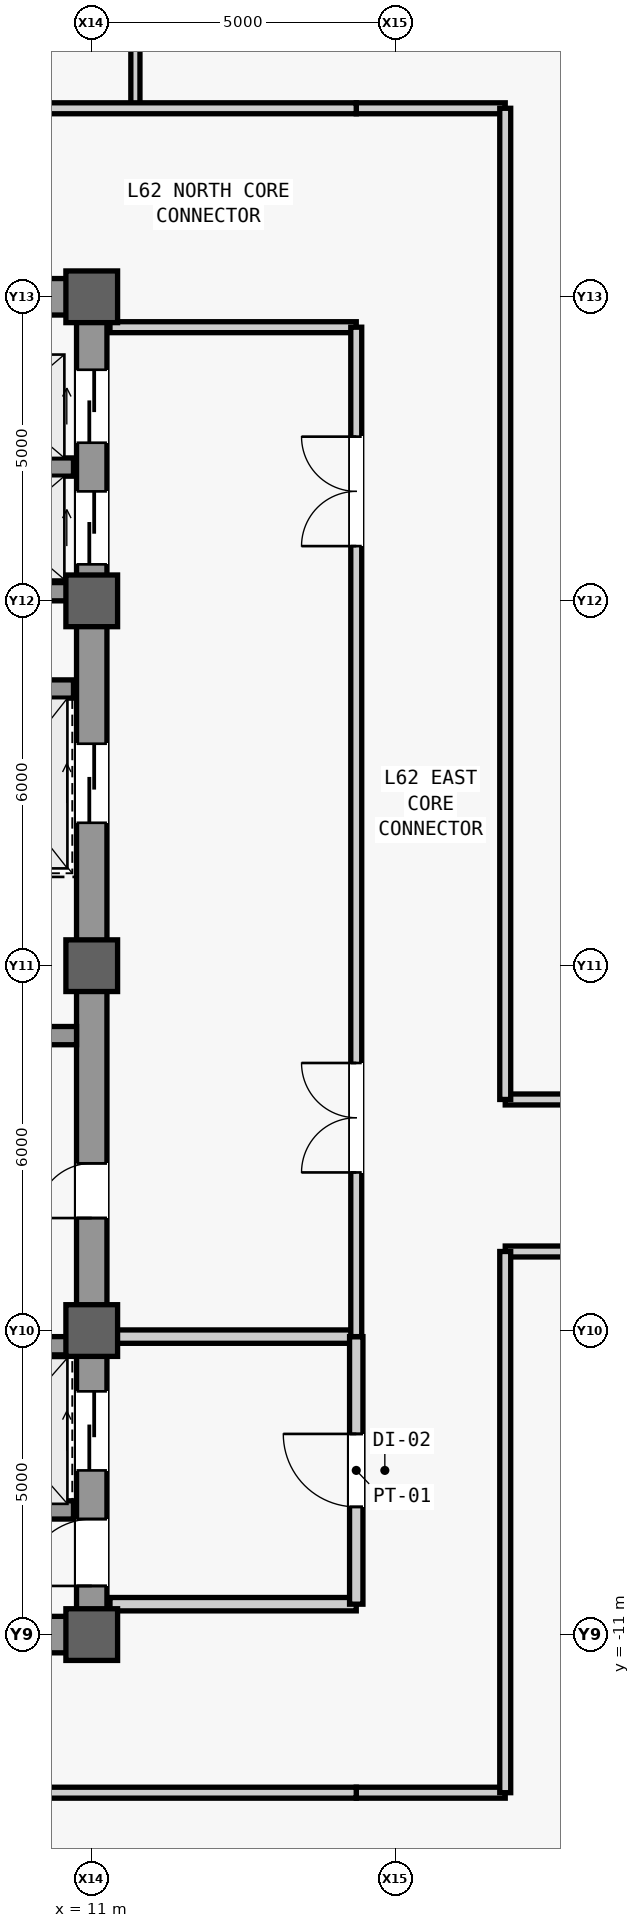
"""IFC4 building model, lengths in metres.
Left out: names, types, materials, properties, quantities, classifications, styles, units other than length and angle.
Written with IfcOpenShell. Run it as: python <this file> out.ifc"""

import sys

from ifc_helpers import new_model, si_unit, direction, frame, frame_2d, origin, origin_2d, place, context, subcontext, project, spatial, rectangle, extrude, source, transform, mapped, element, fill, save


model = new_model("IFC4")
c1 = context("Model", 3, precision=1e-05, world=origin(), true_north=direction((0.0, 1.0)))
c2 = subcontext(c1, "Body", "Model", "MODEL_VIEW")
j1 = project(units=[si_unit("LENGTHUNIT", "METRE"), si_unit("PLANEANGLEUNIT", "RADIAN")], contexts=[c1])
p1 = place(None, origin())
s1 = spatial("IfcSite", under=j1, at=p1, CompositionType="ELEMENT")
p2 = place(p1, origin())
s2 = spatial("IfcBuilding", under=s1, at=p2, CompositionType="ELEMENT")
p3 = place(p2, frame((0.0, 0.0, 263.1)))
s3 = spatial("IfcBuildingStorey", under=s2, at=p3, CompositionType="ELEMENT", Elevation=263.1)
m1 = source(origin(), c2, "Body", "SweptSolid", [
    extrude(rectangle(XDim=22.0, YDim=0.5, at=frame_2d((11.0, 0.0))), origin(), (0.0, 0.0, 1.0), 4.6),
])
p4 = place(p3, frame((11.0, -11.0, 0.0), z_axis=(0.0, 0.0, 1.0), x_axis=(0.0, 1.0, 0.0)))
e1 = element("IfcWall", 1, at=p4, inside=s3, PredefinedType="SHEAR", context=c2, shape_type="MappedRepresentation", body=[
    mapped(m1, transform((0.0, 0.0, 0.0), scale=1.0)),
])
m2 = source(origin(), c2, "Body", "SweptSolid", [
    extrude(rectangle(XDim=1.1, YDim=2.2, at=frame_2d((0.55, 1.1))), frame((0.0, 0.26, 0.0), z_axis=(0.0, -1.0, 0.0), x_axis=(1.0, 0.0, 0.0)), (0.0, 0.0, 1.0), 0.52),
])
p5 = place(p4, frame((0.8, 0.0, 0.0)))
e2 = element("IfcOpeningElement", 2, at=p5, cuts=e1, PredefinedType="OPENING", context=c2, shape_type="MappedRepresentation", body=[
    mapped(m2, transform((0.0, 0.0, 0.0), scale=1.0)),
])
m3 = source(origin(), c2, "Body", "SweptSolid", [
    extrude(rectangle(XDim=0.9, YDim=2.15, at=frame_2d((0.45, 1.075))), frame((0.0, 0.26, 0.0), z_axis=(0.0, -1.0, 0.0), x_axis=(1.0, 0.0, 0.0)), (0.0, 0.0, 1.0), 0.52),
])
p6 = place(p4, frame((6.85, 0.0, 0.0)))
e3 = element("IfcOpeningElement", 3, at=p6, cuts=e1, PredefinedType="OPENING", context=c2, shape_type="MappedRepresentation", body=[
    mapped(m3, transform((0.0, 0.0, 0.0), scale=1.0)),
])
m4 = source(origin(), c2, "Body", "SweptSolid", [
    extrude(rectangle(XDim=1.2, YDim=2.3, at=frame_2d((0.6, 1.15))), frame((0.0, 0.26, 0.0), z_axis=(0.0, -1.0, 0.0), x_axis=(1.0, 0.0, 0.0)), (0.0, 0.0, 1.0), 0.52),
])
p7 = place(p4, frame((17.6, 0.0, 0.0)))
e4 = element("IfcOpeningElement", 4, at=p7, cuts=e1, PredefinedType="OPENING", context=c2, shape_type="MappedRepresentation", body=[
    mapped(m4, transform((0.0, 0.0, 0.0), scale=1.0)),
])
p8 = place(p4, frame((19.6, 0.0, 0.0)))
e5 = element("IfcOpeningElement", 5, at=p8, cuts=e1, PredefinedType="OPENING", context=c2, shape_type="MappedRepresentation", body=[
    mapped(m4, transform((0.0, 0.0, 0.0), scale=1.0)),
])
m5 = source(origin(), c2, "Body", "SweptSolid", [
    extrude(rectangle(XDim=1.3, YDim=2.3, at=frame_2d((0.65, 1.15))), frame((0.0, 0.26, 0.0), z_axis=(0.0, -1.0, 0.0), x_axis=(1.0, 0.0, 0.0)), (0.0, 0.0, 1.0), 0.52),
])
p9 = place(p4, frame((2.7, 0.0, 0.0)))
e6 = element("IfcOpeningElement", 6, at=p9, cuts=e1, PredefinedType="OPENING", context=c2, shape_type="MappedRepresentation", body=[
    mapped(m5, transform((0.0, 0.0, 0.0), scale=1.0)),
])
p10 = place(p4, frame((13.35, 0.0, 0.0)))
e7 = element("IfcOpeningElement", 7, at=p10, cuts=e1, PredefinedType="OPENING", context=c2, shape_type="MappedRepresentation", body=[
    mapped(m5, transform((0.0, 0.0, 0.0), scale=1.0)),
])
m6 = source(origin(), c2, "Body", "SweptSolid", [
    extrude(rectangle(XDim=5.9, YDim=0.6, at=frame_2d((2.95, 0.0))), origin(), (0.0, 0.0, 1.0), 4.6),
])
p11 = place(p3, frame((4.85, -11.0, 0.0), z_axis=(0.0, 0.0, 1.0), x_axis=(1.0, 0.0, 0.0)))
e8 = element("IfcWall", 8, at=p11, inside=s3, PredefinedType="SHEAR", context=c2, shape_type="MappedRepresentation", body=[
    mapped(m6, transform((0.0, 0.0, 0.0), scale=1.0)),
])
p12 = place(p3, frame((4.85, 11.0, 0.0), z_axis=(0.0, 0.0, 1.0), x_axis=(1.0, 0.0, 0.0)))
e9 = element("IfcWall", 9, at=p12, inside=s3, PredefinedType="SHEAR", context=c2, shape_type="MappedRepresentation", body=[
    mapped(m6, transform((0.0, 0.0, 0.0), scale=1.0)),
])
m7 = source(origin(), c2, "Body", "SweptSolid", [
    extrude(rectangle(XDim=1.05, YDim=2.2, at=frame_2d((0.525, 1.1))), frame((0.0, 0.31, 0.0), z_axis=(0.0, -1.0, 0.0), x_axis=(1.0, 0.0, 0.0)), (0.0, 0.0, 1.0), 0.62),
])
p13 = place(p12, frame((1.375, 0.0, 0.0)))
e10 = element("IfcOpeningElement", 10, at=p13, cuts=e9, PredefinedType="OPENING", context=c2, shape_type="MappedRepresentation", body=[
    mapped(m7, transform((0.0, 0.0, 0.0), scale=1.0)),
])
m8 = source(origin(), c2, "Body", "SweptSolid", [
    extrude(rectangle(XDim=5.65, YDim=0.3, at=frame_2d((2.825, 0.0))), origin(), (0.0, 0.0, 1.0), 4.6),
])
p14 = place(p3, frame((5.1, -1.15, 0.0), z_axis=(0.0, 0.0, 1.0), x_axis=(1.0, 0.0, 0.0)))
e11 = element("IfcWall", 11, at=p14, inside=s3, PredefinedType="SHEAR", context=c2, shape_type="MappedRepresentation", body=[
    mapped(m8, transform((0.0, 0.0, 0.0), scale=1.0)),
])
m9 = source(origin(), c2, "Body", "SweptSolid", [
    extrude(rectangle(XDim=0.85, YDim=0.85, at=origin_2d()), origin(), (0.0, 0.0, 1.0), 5.2),
])
for number, where, z_axis, x_axis in (
    (12, (11.0, -11.0, 0.0), (0.0, 0.0, 1.0), (1.0, 0.0, 0.0)),
    (13, (11.0, -6.0, 0.0), (0.0, 0.0, 1.0), (1.0, 0.0, 0.0)),
    (14, (11.0, 0.0, 0.0), (0.0, 0.0, 1.0), (1.0, 0.0, 0.0)),
    (15, (11.0, 6.0, 0.0), (0.0, 0.0, 1.0), (1.0, 0.0, 0.0)),
    (16, (11.0, 11.0, 0.0), (0.0, 0.0, 1.0), (1.0, 0.0, 0.0)),
):
    element("IfcColumn", number, at=place(p3, frame(where, z_axis=z_axis, x_axis=x_axis)), inside=s3, PredefinedType="COLUMN", context=c2, shape_type="MappedRepresentation", body=[
        mapped(m9, transform((0.0, 0.0, 0.0), scale=1.0)),
    ])
m10 = source(origin(), c2, "Body", "SweptSolid", [
    extrude(rectangle(XDim=2.2, YDim=0.3, at=frame_2d((1.1, 0.0))), origin(), (0.0, 0.0, 1.0), 4.6),
])
for number, where, z_axis, x_axis in (
    (17, (8.5, -8.95, 0.0), (0.0, 0.0, 1.0), (1.0, 0.0, 0.0)),
    (18, (8.5, -6.25, 0.0), (0.0, 0.0, 1.0), (1.0, 0.0, 0.0)),
):
    element("IfcWall", number, at=place(p3, frame(where, z_axis=z_axis, x_axis=x_axis)), inside=s3, PredefinedType="SHEAR", context=c2, shape_type="MappedRepresentation", body=[
        mapped(m10, transform((0.0, 0.0, 0.0), scale=1.0)),
    ])
m11 = source(origin(), c2, "Body", "SweptSolid", [
    extrude(rectangle(XDim=2.3, YDim=0.3, at=frame_2d((1.15, 0.0))), origin(), (0.0, 0.0, 1.0), 4.6),
])
for number, where, z_axis, x_axis in (
    (19, (8.4, 4.55, 0.0), (0.0, 0.0, 1.0), (1.0, 0.0, 0.0)),
    (20, (8.4, 6.15, 0.0), (0.0, 0.0, 1.0), (1.0, 0.0, 0.0)),
    (21, (8.4, 8.2, 0.0), (0.0, 0.0, 1.0), (1.0, 0.0, 0.0)),
):
    element("IfcWall", number, at=place(p3, frame(where, z_axis=z_axis, x_axis=x_axis)), inside=s3, PredefinedType="SHEAR", context=c2, shape_type="MappedRepresentation", body=[
        mapped(m11, transform((0.0, 0.0, 0.0), scale=1.0)),
    ])
m12 = source(origin(), c2, "Body", "SweptSolid", [
    extrude(rectangle(XDim=4.05, YDim=0.22, at=frame_2d((2.025, 0.0))), origin(), (0.0, 0.0, 1.0), 4.6),
])
p15 = place(p3, frame((11.3, -10.5, 0.0), z_axis=(0.0, 0.0, 1.0), x_axis=(1.0, 0.0, 0.0)))
e22 = element("IfcWall", 22, at=p15, inside=s3, PredefinedType="PARTITIONING", context=c2, shape_type="MappedRepresentation", body=[
    mapped(m12, transform((0.0, 0.0, 0.0), scale=1.0)),
])
m13 = source(origin(), c2, "Body", "SweptSolid", [
    extrude(rectangle(XDim=4.05, YDim=0.22, at=frame_2d((2.025, 0.0))), origin(), (0.0, 0.0, 1.0), 2.8),
])
p16 = place(p3, frame((11.3, -6.1, 0.0), z_axis=(0.0, 0.0, 1.0), x_axis=(1.0, 0.0, 0.0)))
e23 = element("IfcWall", 23, at=p16, inside=s3, PredefinedType="PARTITIONING", context=c2, shape_type="MappedRepresentation", body=[
    mapped(m13, transform((0.0, 0.0, 0.0), scale=1.0)),
])
m14 = source(origin(), c2, "Body", "SweptSolid", [
    extrude(rectangle(XDim=4.4, YDim=0.22, at=frame_2d((2.2, 0.0))), origin(), (0.0, 0.0, 1.0), 4.6),
])
p17 = place(p3, frame((15.35, -10.5, 0.0), z_axis=(0.0, 0.0, 1.0), x_axis=(0.0, 1.0, 0.0)))
e24 = element("IfcWall", 24, at=p17, inside=s3, PredefinedType="PARTITIONING", context=c2, shape_type="MappedRepresentation", body=[
    mapped(m14, transform((0.0, 0.0, 0.0), scale=1.0)),
])
m15 = source(origin(), c2, "Body", "SweptSolid", [
    extrude(rectangle(XDim=1.2, YDim=2.2, at=frame_2d((0.6, 1.1))), frame((0.0, 0.12, 0.0), z_axis=(0.0, -1.0, 0.0), x_axis=(1.0, 0.0, 0.0)), (0.0, 0.0, 1.0), 0.24),
])
p18 = place(p17, frame((1.6, 0.0, 0.0)))
e25 = element("IfcOpeningElement", 25, at=p18, cuts=e24, PredefinedType="OPENING", context=c2, shape_type="MappedRepresentation", body=[
    mapped(m15, transform((0.0, 0.0, 0.0), scale=1.0)),
])
m16 = source(origin(), c2, "Body", "SweptSolid", [
    extrude(rectangle(XDim=4.05, YDim=0.18, at=frame_2d((2.025, 0.0))), origin(), (0.0, 0.0, 1.0), 4.6),
])
p19 = place(p3, frame((11.3, 10.5, 0.0), z_axis=(0.0, 0.0, 1.0), x_axis=(1.0, 0.0, 0.0)))
e26 = element("IfcWall", 26, at=p19, inside=s3, PredefinedType="PARTITIONING", context=c2, shape_type="MappedRepresentation", body=[
    mapped(m16, transform((0.0, 0.0, 0.0), scale=1.0)),
])
m17 = source(origin(), c2, "Body", "SweptSolid", [
    extrude(rectangle(XDim=16.6, YDim=0.18, at=frame_2d((8.3, 0.0))), origin(), (0.0, 0.0, 1.0), 4.6),
])
p20 = place(p3, frame((15.35, -6.1, 0.0), z_axis=(0.0, 0.0, 1.0), x_axis=(0.0, 1.0, 0.0)))
e27 = element("IfcWall", 27, at=p20, inside=s3, PredefinedType="PARTITIONING", context=c2, shape_type="MappedRepresentation", body=[
    mapped(m17, transform((0.0, 0.0, 0.0), scale=1.0)),
])
m18 = source(origin(), c2, "Body", "SweptSolid", [
    extrude(rectangle(XDim=1.8, YDim=2.25, at=frame_2d((0.9, 1.125))), frame((0.0, 0.1, 0.0), z_axis=(0.0, -1.0, 0.0), x_axis=(1.0, 0.0, 0.0)), (0.0, 0.0, 1.0), 0.2),
])
p21 = place(p20, frame((2.7, 0.0, 0.0)))
e28 = element("IfcOpeningElement", 28, at=p21, cuts=e27, PredefinedType="OPENING", context=c2, shape_type="MappedRepresentation", body=[
    mapped(m18, transform((0.0, 0.0, 0.0), scale=1.0)),
])
p22 = place(p20, frame((13.0, 0.0, 0.0)))
e29 = element("IfcOpeningElement", 29, at=p22, cuts=e27, PredefinedType="OPENING", context=c2, shape_type="MappedRepresentation", body=[
    mapped(m18, transform((0.0, 0.0, 0.0), scale=1.0)),
])
m19 = source(origin(), c2, "Body", "SweptSolid", [
    extrude(rectangle(XDim=2.45, YDim=0.18, at=frame_2d((1.225, 0.0))), origin(), (0.0, 0.0, 1.0), 4.6),
])
for number, where, z_axis, x_axis in (
    (30, (15.35, -13.6, 0.0), (0.0, 0.0, 1.0), (1.0, 0.0, 0.0)),
    (31, (15.35, 14.1, 0.0), (0.0, 0.0, 1.0), (1.0, 0.0, 0.0)),
):
    element("IfcWall", number, at=place(p3, frame(where, z_axis=z_axis, x_axis=x_axis)), inside=s3, PredefinedType="PARTITIONING", context=c2, shape_type="MappedRepresentation", body=[
        mapped(m19, transform((0.0, 0.0, 0.0), scale=1.0)),
    ])
m20 = source(origin(), c2, "Body", "SweptSolid", [
    extrude(rectangle(XDim=25.45, YDim=0.18, at=frame_2d((12.725, 0.0))), origin(), (0.0, 0.0, 1.0), 4.6),
])
p23 = place(p3, frame((-10.1, -13.6, 0.0), z_axis=(0.0, 0.0, 1.0), x_axis=(1.0, 0.0, 0.0)))
e32 = element("IfcWall", 32, at=p23, inside=s3, PredefinedType="PARTITIONING", context=c2, shape_type="MappedRepresentation", body=[
    mapped(m20, transform((0.0, 0.0, 0.0), scale=1.0)),
])
m21 = source(origin(), c2, "Body", "SweptSolid", [
    extrude(rectangle(XDim=15.9, YDim=0.15, at=frame_2d((7.95, 0.0))), origin(), (0.0, 0.0, 1.0), 4.6),
])
p24 = place(p3, frame((11.718, 14.1, 0.0), z_axis=(0.0, 0.0, 1.0), x_axis=(0.0, 1.0, 0.0)))
e33 = element("IfcWall", 33, at=p24, inside=s3, PredefinedType="PARTITIONING", context=c2, shape_type="MappedRepresentation", body=[
    mapped(m21, transform((0.0, 0.0, 0.0), scale=1.0)),
])
m22 = source(origin(), c2, "Body", "SweptSolid", [
    extrude(rectangle(XDim=0.95, YDim=2.15, at=frame_2d((0.475, 1.075))), frame((0.0, 0.085, 0.0), z_axis=(0.0, -1.0, 0.0), x_axis=(1.0, 0.0, 0.0)), (0.0, 0.0, 1.0), 0.17),
])
p25 = place(p24, frame((11.45, 0.0, 0.0)))
e34 = element("IfcOpeningElement", 34, at=p25, cuts=e33, PredefinedType="OPENING", context=c2, shape_type="MappedRepresentation", body=[
    mapped(m22, transform((0.0, 0.0, 0.0), scale=1.0)),
])
m23 = source(origin(), c2, "Body", "SweptSolid", [
    extrude(rectangle(XDim=13.25, YDim=0.18, at=frame_2d((6.625, 0.0))), origin(), (0.0, 0.0, 1.0), 4.6),
])
p26 = place(p3, frame((2.1, 14.1, 0.0), z_axis=(0.0, 0.0, 1.0), x_axis=(1.0, 0.0, 0.0)))
e35 = element("IfcWall", 35, at=p26, inside=s3, PredefinedType="PARTITIONING", context=c2, shape_type="MappedRepresentation", body=[
    mapped(m23, transform((0.0, 0.0, 0.0), scale=1.0)),
])
m24 = source(origin(), c2, "Body", "SweptSolid", [
    extrude(rectangle(XDim=12.2, YDim=0.18, at=frame_2d((6.1, 0.0))), origin(), (0.0, 0.0, 1.0), 4.6),
])
p27 = place(p3, frame((17.8, -4.7, 0.0), z_axis=(0.0, 0.0, 1.0), x_axis=(1.0, 0.0, 0.0)))
e36 = element("IfcWall", 36, at=p27, inside=s3, PredefinedType="PARTITIONING", context=c2, shape_type="MappedRepresentation", body=[
    mapped(m24, transform((0.0, 0.0, 0.0), scale=1.0)),
])
m25 = source(origin(), c2, "Body", "SweptSolid", [
    extrude(rectangle(XDim=0.95, YDim=2.15, at=frame_2d((0.475, 1.075))), frame((0.0, 0.1, 0.0), z_axis=(0.0, -1.0, 0.0), x_axis=(1.0, 0.0, 0.0)), (0.0, 0.0, 1.0), 0.2),
])
p28 = place(p27, frame((2.758, 0.0, 0.0)))
e37 = element("IfcOpeningElement", 37, at=p28, cuts=e36, PredefinedType="OPENING", context=c2, shape_type="MappedRepresentation", body=[
    mapped(m25, transform((0.0, 0.0, 0.0), scale=1.0)),
])
p29 = place(p27, frame((8.858, 0.0, 0.0)))
e38 = element("IfcOpeningElement", 38, at=p29, cuts=e36, PredefinedType="OPENING", context=c2, shape_type="MappedRepresentation", body=[
    mapped(m25, transform((0.0, 0.0, 0.0), scale=1.0)),
])
m26 = source(origin(), c2, "Body", "SweptSolid", [
    extrude(rectangle(XDim=8.9, YDim=0.18, at=frame_2d((4.45, 0.0))), origin(), (0.0, 0.0, 1.0), 4.6),
])
p30 = place(p3, frame((17.8, -13.6, 0.0), z_axis=(0.0, 0.0, 1.0), x_axis=(0.0, 1.0, 0.0)))
e39 = element("IfcWall", 39, at=p30, inside=s3, PredefinedType="PARTITIONING", context=c2, shape_type="MappedRepresentation", body=[
    mapped(m26, transform((0.0, 0.0, 0.0), scale=1.0)),
])
p31 = place(p3, frame((17.8, -2.2, 0.0), z_axis=(0.0, 0.0, 1.0), x_axis=(1.0, 0.0, 0.0)))
e40 = element("IfcWall", 40, at=p31, inside=s3, PredefinedType="PARTITIONING", context=c2, shape_type="MappedRepresentation", body=[
    mapped(m24, transform((0.0, 0.0, 0.0), scale=1.0)),
])
p32 = place(p31, frame((5.625, 0.0, 0.0)))
e41 = element("IfcOpeningElement", 41, at=p32, cuts=e40, PredefinedType="OPENING", context=c2, shape_type="MappedRepresentation", body=[
    mapped(m25, transform((0.0, 0.0, 0.0), scale=1.0)),
])
m27 = source(origin(), c2, "Body", "SweptSolid", [
    extrude(rectangle(XDim=16.3, YDim=0.18, at=frame_2d((8.15, 0.0))), origin(), (0.0, 0.0, 1.0), 4.6),
])
p33 = place(p3, frame((17.8, -2.2, 0.0), z_axis=(0.0, 0.0, 1.0), x_axis=(0.0, 1.0, 0.0)))
e42 = element("IfcWall", 42, at=p33, inside=s3, PredefinedType="PARTITIONING", context=c2, shape_type="MappedRepresentation", body=[
    mapped(m27, transform((0.0, 0.0, 0.0), scale=1.0)),
])
m28 = source(origin(), c2, "Body", "SweptSolid", [
    extrude(rectangle(XDim=1.1, YDim=2.2, at=frame_2d((0.55, 1.1))), frame((0.0, 0.025, 0.0), z_axis=(0.0, -1.0, 0.0), x_axis=(1.0, 0.0, 0.0)), (0.0, 0.0, 1.0), 0.05),
])
p34 = place(p5, origin())
e43 = element("IfcDoor", 43, at=p34, inside=s3, OperationType="SINGLE_SWING_LEFT", PredefinedType="DOOR", context=c2, shape_type="MappedRepresentation", body=[
    mapped(m28, transform((0.0, 0.0, 0.0), scale=1.0)),
])
fill(e2, e43)
m29 = source(origin(), c2, "Body", "SweptSolid", [
    extrude(rectangle(XDim=0.9, YDim=2.15, at=frame_2d((0.45, 1.075))), frame((0.0, 0.025, 0.0), z_axis=(0.0, -1.0, 0.0), x_axis=(1.0, 0.0, 0.0)), (0.0, 0.0, 1.0), 0.05),
])
p35 = place(p6, origin())
e44 = element("IfcDoor", 44, at=p35, inside=s3, OperationType="SINGLE_SWING_LEFT", PredefinedType="DOOR", context=c2, shape_type="MappedRepresentation", body=[
    mapped(m29, transform((0.0, 0.0, 0.0), scale=1.0)),
])
fill(e3, e44)
m30 = source(origin(), c2, "Body", "SweptSolid", [
    extrude(rectangle(XDim=1.2, YDim=2.2, at=frame_2d((0.6, 1.1))), frame((0.0, 0.025, 0.0), z_axis=(0.0, -1.0, 0.0), x_axis=(1.0, 0.0, 0.0)), (0.0, 0.0, 1.0), 0.05),
])
p36 = place(p18, origin())
e45 = element("IfcDoor", 45, at=p36, inside=s3, OperationType="SINGLE_SWING_RIGHT", PredefinedType="DOOR", context=c2, shape_type="MappedRepresentation", body=[
    mapped(m30, transform((0.0, 0.0, 0.0), scale=1.0)),
])
fill(e25, e45)
m31 = source(origin(), c2, "Body", "SweptSolid", [
    extrude(rectangle(XDim=1.8, YDim=2.25, at=frame_2d((0.9, 1.125))), frame((0.0, 0.025, 0.0), z_axis=(0.0, -1.0, 0.0), x_axis=(1.0, 0.0, 0.0)), (0.0, 0.0, 1.0), 0.05),
])
p37 = place(p21, origin())
e46 = element("IfcDoor", 46, at=p37, inside=s3, OperationType="SINGLE_SWING_RIGHT", PredefinedType="DOOR", context=c2, shape_type="MappedRepresentation", body=[
    mapped(m31, transform((0.0, 0.0, 0.0), scale=1.0)),
])
fill(e28, e46)
p38 = place(p22, origin())
e47 = element("IfcDoor", 47, at=p38, inside=s3, OperationType="SINGLE_SWING_LEFT", PredefinedType="DOOR", context=c2, shape_type="MappedRepresentation", body=[
    mapped(m31, transform((0.0, 0.0, 0.0), scale=1.0)),
])
fill(e29, e47)
m32 = source(origin(), c2, "Body", "SweptSolid", [
    extrude(rectangle(XDim=1.2, YDim=2.3, at=frame_2d((0.6, 1.15))), frame((0.0, 0.025, 0.0), z_axis=(0.0, -1.0, 0.0), x_axis=(1.0, 0.0, 0.0)), (0.0, 0.0, 1.0), 0.05),
])
p39 = place(p7, origin())
e48 = element("IfcDoor", 48, at=p39, inside=s3, OperationType="SLIDING_TO_LEFT", PredefinedType="DOOR", context=c2, shape_type="MappedRepresentation", body=[
    mapped(m32, transform((0.0, 0.0, 0.0), scale=1.0)),
])
fill(e4, e48)
p40 = place(p8, origin())
e49 = element("IfcDoor", 49, at=p40, inside=s3, OperationType="SLIDING_TO_LEFT", PredefinedType="DOOR", context=c2, shape_type="MappedRepresentation", body=[
    mapped(m32, transform((0.0, 0.0, 0.0), scale=1.0)),
])
fill(e5, e49)
m33 = source(origin(), c2, "Body", "SweptSolid", [
    extrude(rectangle(XDim=1.3, YDim=2.3, at=frame_2d((0.65, 1.15))), frame((0.0, 0.025, 0.0), z_axis=(0.0, -1.0, 0.0), x_axis=(1.0, 0.0, 0.0)), (0.0, 0.0, 1.0), 0.05),
])
p41 = place(p9, origin())
e50 = element("IfcDoor", 50, at=p41, inside=s3, OperationType="SLIDING_TO_LEFT", PredefinedType="DOOR", context=c2, shape_type="MappedRepresentation", body=[
    mapped(m33, transform((0.0, 0.0, 0.0), scale=1.0)),
])
fill(e6, e50)
p42 = place(p10, origin())
e51 = element("IfcDoor", 51, at=p42, inside=s3, OperationType="SLIDING_TO_LEFT", PredefinedType="DOOR", context=c2, shape_type="MappedRepresentation", body=[
    mapped(m33, transform((0.0, 0.0, 0.0), scale=1.0)),
])
fill(e7, e51)
save(model, sys.argv[1])
